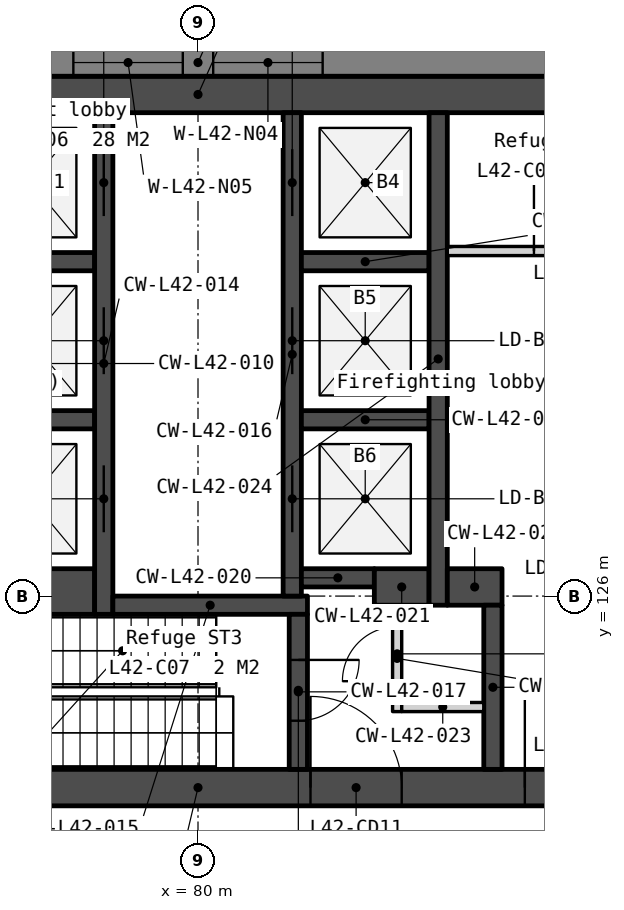
"""IFC4 building model, lengths in metres.
Left out: names, types, materials, properties, quantities, classifications, styles, units other than length and angle.
Written with IfcOpenShell. Run it as: python <this file> out.ifc"""

import sys

from ifc_helpers import new_model, si_unit, direction, frame, frame_2d, origin, place, context, subcontext, project, spatial, polyline, rectangle, outline, extrude, element, fill, save


model = new_model("IFC4")
c1 = context("Model", 3, precision=1e-05, world=origin(), true_north=direction((0.0, 1.0)))
c2 = subcontext(c1, "Body", "Model", "MODEL_VIEW")
j1 = project(units=[si_unit("LENGTHUNIT", "METRE"), si_unit("PLANEANGLEUNIT", "RADIAN")], contexts=[c1])
p1 = place(None, origin())
s1 = spatial("IfcSite", under=j1, at=p1, CompositionType="ELEMENT")
p2 = place(p1, origin())
s2 = spatial("IfcBuilding", under=s1, at=p2, CompositionType="ELEMENT")
p3 = place(p2, frame((0.0, 0.0, 167.6)))
s3 = spatial("IfcBuildingStorey", under=s2, at=p3, CompositionType="ELEMENT", Elevation=167.6)
p4 = place(p3, frame((69.0, 134.25, 0.0), z_axis=(0.0, 0.0, 1.0), x_axis=(1.0, 0.0, 0.0)))
e1 = element("IfcWall", 1, at=p4, inside=s3, PredefinedType="SOLIDWALL", context=c2, shape_type="SweptSolid", body=[
    extrude(rectangle(XDim=22.0, YDim=0.6, at=frame_2d((11.0, 0.0))), origin(), (0.0, 0.0, 1.0), 3.75),
])
p5 = place(p3, frame((69.0, 122.85, 0.0), z_axis=(0.0, 0.0, 1.0), x_axis=(1.0, 0.0, 0.0)))
e2 = element("IfcWall", 2, at=p5, inside=s3, PredefinedType="SOLIDWALL", context=c2, shape_type="SweptSolid", body=[
    extrude(rectangle(XDim=22.0, YDim=0.6, at=frame_2d((11.0, 0.0))), origin(), (0.0, 0.0, 1.0), 3.75),
])
p6 = place(p5, frame((16.375, 0.0, 0.0)))
e3 = element("IfcOpeningElement", 3, at=p6, cuts=e2, PredefinedType="OPENING", context=c2, shape_type="SweptSolid", body=[
    extrude(rectangle(XDim=1.8, YDim=2.1, at=frame_2d((0.9, 1.05))), frame((0.0, 0.31, 0.0), z_axis=(0.0, -1.0, 0.0), x_axis=(1.0, 0.0, 0.0)), (0.0, 0.0, 1.0), 0.62),
])
p7 = place(p5, frame((3.825, 0.0, 0.0)))
e4 = element("IfcOpeningElement", 4, at=p7, cuts=e2, PredefinedType="OPENING", context=c2, shape_type="SweptSolid", body=[
    extrude(rectangle(XDim=1.8, YDim=2.1, at=frame_2d((0.9, 1.05))), frame((0.0, 0.31, 0.0), z_axis=(0.0, -1.0, 0.0), x_axis=(1.0, 0.0, 0.0)), (0.0, 0.0, 1.0), 0.62),
])
p8 = place(p5, frame((12.85, 0.0, 0.0)))
e5 = element("IfcOpeningElement", 5, at=p8, cuts=e2, PredefinedType="OPENING", context=c2, shape_type="SweptSolid", body=[
    extrude(rectangle(XDim=1.5, YDim=2.1, at=frame_2d((0.75, 1.05))), frame((0.0, 0.31, 0.0), z_axis=(0.0, -1.0, 0.0), x_axis=(1.0, 0.0, 0.0)), (0.0, 0.0, 1.0), 0.62),
])
for number, where, z_axis, x_axis in (
    (6, (76.2, 131.5, 0.0), (0.0, 0.0, 1.0), (1.0, 0.0, 0.0)),
    (7, (76.2, 128.9, 0.0), (0.0, 0.0, 1.0), (1.0, 0.0, 0.0)),
):
    element("IfcWall", number, at=place(p3, frame(where, z_axis=z_axis, x_axis=x_axis)), inside=s3, PredefinedType="SOLIDWALL", context=c2, shape_type="SweptSolid", body=[
        extrude(rectangle(XDim=2.1, YDim=0.3, at=frame_2d((1.05, 0.0))), origin(), (0.0, 0.0, 1.0), 3.75),
    ])
p9 = place(p3, frame((76.2, 126.075, 0.0), z_axis=(0.0, 0.0, 1.0), x_axis=(1.0, 0.0, 0.0)))
e8 = element("IfcWall", 8, at=p9, inside=s3, PredefinedType="SOLIDWALL", context=c2, shape_type="SweptSolid", body=[
    extrude(rectangle(XDim=2.1, YDim=0.75, at=frame_2d((1.05, 0.0))), origin(), (0.0, 0.0, 1.0), 3.75),
])
p10 = place(p3, frame((78.45, 133.95, 0.0), z_axis=(0.0, 0.0, 1.0), x_axis=(0.0, -1.0, 0.0)))
e9 = element("IfcWall", 9, at=p10, inside=s3, PredefinedType="SOLIDWALL", context=c2, shape_type="SweptSolid", body=[
    extrude(rectangle(XDim=8.25, YDim=0.3, at=frame_2d((4.125, 0.0))), origin(), (0.0, 0.0, 1.0), 3.75),
])
p11 = place(p10, frame((0.6, 0.0, 0.0)))
e10 = element("IfcOpeningElement", 10, at=p11, cuts=e9, PredefinedType="OPENING", context=c2, shape_type="SweptSolid", body=[
    extrude(rectangle(XDim=1.1, YDim=2.1, at=frame_2d((0.55, 1.05))), frame((0.0, 0.16, 0.0), z_axis=(0.0, -1.0, 0.0), x_axis=(1.0, 0.0, 0.0)), (0.0, 0.0, 1.0), 0.32),
])
p12 = place(p10, frame((3.2, 0.0, 0.0)))
e11 = element("IfcOpeningElement", 11, at=p12, cuts=e9, PredefinedType="OPENING", context=c2, shape_type="SweptSolid", body=[
    extrude(rectangle(XDim=1.1, YDim=2.1, at=frame_2d((0.55, 1.05))), frame((0.0, 0.16, 0.0), z_axis=(0.0, -1.0, 0.0), x_axis=(1.0, 0.0, 0.0)), (0.0, 0.0, 1.0), 0.32),
])
p13 = place(p10, frame((5.8, 0.0, 0.0)))
e12 = element("IfcOpeningElement", 12, at=p13, cuts=e9, PredefinedType="OPENING", context=c2, shape_type="SweptSolid", body=[
    extrude(rectangle(XDim=1.1, YDim=2.1, at=frame_2d((0.55, 1.05))), frame((0.0, 0.16, 0.0), z_axis=(0.0, -1.0, 0.0), x_axis=(1.0, 0.0, 0.0)), (0.0, 0.0, 1.0), 0.32),
])
p14 = place(p3, frame((78.6, 125.85, 0.0), z_axis=(0.0, 0.0, 1.0), x_axis=(1.0, 0.0, 0.0)))
e13 = element("IfcWall", 13, at=p14, inside=s3, PredefinedType="SOLIDWALL", context=c2, shape_type="SweptSolid", body=[
    extrude(rectangle(XDim=3.2, YDim=0.3, at=frame_2d((1.6, 0.0))), origin(), (0.0, 0.0, 1.0), 3.75),
])
p15 = place(p3, frame((81.55, 133.95, 0.0), z_axis=(0.0, 0.0, 1.0), x_axis=(0.0, -1.0, 0.0)))
e14 = element("IfcWall", 14, at=p15, inside=s3, PredefinedType="SOLIDWALL", context=c2, shape_type="SweptSolid", body=[
    extrude(rectangle(XDim=7.95, YDim=0.3, at=frame_2d((3.975, 0.0))), origin(), (0.0, 0.0, 1.0), 3.75),
])
p16 = place(p15, frame((0.6, 0.0, 0.0)))
e15 = element("IfcOpeningElement", 15, at=p16, cuts=e14, PredefinedType="OPENING", context=c2, shape_type="SweptSolid", body=[
    extrude(rectangle(XDim=1.1, YDim=2.1, at=frame_2d((0.55, 1.05))), frame((0.0, 0.16, 0.0), z_axis=(0.0, -1.0, 0.0), x_axis=(1.0, 0.0, 0.0)), (0.0, 0.0, 1.0), 0.32),
])
p17 = place(p15, frame((3.2, 0.0, 0.0)))
e16 = element("IfcOpeningElement", 16, at=p17, cuts=e14, PredefinedType="OPENING", context=c2, shape_type="SweptSolid", body=[
    extrude(rectangle(XDim=1.1, YDim=2.1, at=frame_2d((0.55, 1.05))), frame((0.0, 0.16, 0.0), z_axis=(0.0, -1.0, 0.0), x_axis=(1.0, 0.0, 0.0)), (0.0, 0.0, 1.0), 0.32),
])
p18 = place(p15, frame((5.8, 0.0, 0.0)))
e17 = element("IfcOpeningElement", 17, at=p18, cuts=e14, PredefinedType="OPENING", context=c2, shape_type="SweptSolid", body=[
    extrude(rectangle(XDim=1.1, YDim=2.1, at=frame_2d((0.55, 1.05))), frame((0.0, 0.16, 0.0), z_axis=(0.0, -1.0, 0.0), x_axis=(1.0, 0.0, 0.0)), (0.0, 0.0, 1.0), 0.32),
])
p19 = place(p3, frame((81.65, 125.7, 0.0), z_axis=(0.0, 0.0, 1.0), x_axis=(0.0, -1.0, 0.0)))
e18 = element("IfcWall", 18, at=p19, inside=s3, PredefinedType="SOLIDWALL", context=c2, shape_type="SweptSolid", body=[
    extrude(rectangle(XDim=2.55, YDim=0.3, at=frame_2d((1.275, 0.0))), origin(), (0.0, 0.0, 1.0), 3.75),
])
p20 = place(p19, frame((0.75, 0.0, 0.0)))
e19 = element("IfcOpeningElement", 19, at=p20, cuts=e18, PredefinedType="OPENING", context=c2, shape_type="SweptSolid", body=[
    extrude(rectangle(XDim=1.0, YDim=2.1, at=frame_2d((0.5, 1.05))), frame((0.0, 0.16, 0.0), z_axis=(0.0, -1.0, 0.0), x_axis=(1.0, 0.0, 0.0)), (0.0, 0.0, 1.0), 0.32),
])
for number, where, z_axis, x_axis in (
    (20, (81.7, 131.5, 0.0), (0.0, 0.0, 1.0), (1.0, 0.0, 0.0)),
    (21, (81.7, 128.9, 0.0), (0.0, 0.0, 1.0), (1.0, 0.0, 0.0)),
):
    element("IfcWall", number, at=place(p3, frame(where, z_axis=z_axis, x_axis=x_axis)), inside=s3, PredefinedType="SOLIDWALL", context=c2, shape_type="SweptSolid", body=[
        extrude(rectangle(XDim=2.1, YDim=0.3, at=frame_2d((1.05, 0.0))), origin(), (0.0, 0.0, 1.0), 3.75),
    ])
p21 = place(p3, frame((81.7, 126.3, 0.0), z_axis=(0.0, 0.0, 1.0), x_axis=(1.0, 0.0, 0.0)))
e22 = element("IfcWall", 22, at=p21, inside=s3, PredefinedType="SOLIDWALL", context=c2, shape_type="SweptSolid", body=[
    extrude(rectangle(XDim=1.2, YDim=0.3, at=frame_2d((0.6, 0.0))), origin(), (0.0, 0.0, 1.0), 3.75),
])
p22 = place(p3, frame((82.9, 126.15, 0.0), z_axis=(0.0, 0.0, 1.0), x_axis=(1.0, 0.0, 0.0)))
e23 = element("IfcWall", 23, at=p22, inside=s3, PredefinedType="SOLIDWALL", context=c2, shape_type="SweptSolid", body=[
    extrude(rectangle(XDim=0.9, YDim=0.6, at=frame_2d((0.45, 0.0))), origin(), (0.0, 0.0, 1.0), 3.75),
])
p23 = place(p3, frame((83.275, 125.85, 0.0), z_axis=(0.0, 0.0, 1.0), x_axis=(0.0, -1.0, 0.0)))
e24 = element("IfcWall", 24, at=p23, inside=s3, PredefinedType="PARTITIONING", context=c2, shape_type="SweptSolid", body=[
    extrude(rectangle(XDim=1.75, YDim=0.15, at=frame_2d((0.875, 0.0))), origin(), (0.0, 0.0, 1.0), 3.75),
])
p24 = place(p23, frame((0.35, 0.0, 0.0)))
e25 = element("IfcOpeningElement", 25, at=p24, cuts=e24, PredefinedType="OPENING", context=c2, shape_type="SweptSolid", body=[
    extrude(rectangle(XDim=0.9, YDim=2.1, at=frame_2d((0.45, 1.05))), frame((0.0, 0.085, 0.0), z_axis=(0.0, -1.0, 0.0), x_axis=(1.0, 0.0, 0.0)), (0.0, 0.0, 1.0), 0.17),
])
p25 = place(p3, frame((83.35, 124.175, 0.0), z_axis=(0.0, 0.0, 1.0), x_axis=(1.0, 0.0, 0.0)))
e26 = element("IfcWall", 26, at=p25, inside=s3, PredefinedType="PARTITIONING", context=c2, shape_type="SweptSolid", body=[
    extrude(rectangle(XDim=1.35, YDim=0.15, at=frame_2d((0.675, 0.0))), origin(), (0.0, 0.0, 1.0), 3.75),
])
p26 = place(p3, frame((83.95, 133.95, 0.0), z_axis=(0.0, 0.0, 1.0), x_axis=(0.0, -1.0, 0.0)))
e27 = element("IfcWall", 27, at=p26, inside=s3, PredefinedType="SOLIDWALL", context=c2, shape_type="SweptSolid", body=[
    extrude(rectangle(XDim=8.1, YDim=0.3, at=frame_2d((4.05, 0.0))), origin(), (0.0, 0.0, 1.0), 3.75),
])
p27 = place(p3, frame((84.1, 131.675, 0.0), z_axis=(0.0, 0.0, 1.0), x_axis=(1.0, 0.0, 0.0)))
e28 = element("IfcWall", 28, at=p27, inside=s3, PredefinedType="PARTITIONING", context=c2, shape_type="SweptSolid", body=[
    extrude(rectangle(XDim=3.45, YDim=0.15, at=frame_2d((1.725, 0.0))), origin(), (0.0, 0.0, 1.0), 3.75),
])
p28 = place(p27, frame((1.425, 0.0, 0.0)))
e29 = element("IfcOpeningElement", 29, at=p28, cuts=e28, PredefinedType="OPENING", context=c2, shape_type="SweptSolid", body=[
    extrude(rectangle(XDim=1.5, YDim=2.1, at=frame_2d((0.75, 1.05))), frame((0.0, 0.085, 0.0), z_axis=(0.0, -1.0, 0.0), x_axis=(1.0, 0.0, 0.0)), (0.0, 0.0, 1.0), 0.17),
])
p29 = place(p3, frame((84.1, 126.15, 0.0), z_axis=(0.0, 0.0, 1.0), x_axis=(1.0, 0.0, 0.0)))
e30 = element("IfcWall", 30, at=p29, inside=s3, PredefinedType="SOLIDWALL", context=c2, shape_type="SweptSolid", body=[
    extrude(rectangle(XDim=0.9, YDim=0.6, at=frame_2d((0.45, 0.0))), origin(), (0.0, 0.0, 1.0), 3.75),
])
p30 = place(p3, frame((84.85, 125.85, 0.0), z_axis=(0.0, 0.0, 1.0), x_axis=(0.0, -1.0, 0.0)))
e31 = element("IfcWall", 31, at=p30, inside=s3, PredefinedType="SOLIDWALL", context=c2, shape_type="SweptSolid", body=[
    extrude(rectangle(XDim=2.7, YDim=0.3, at=frame_2d((1.35, 0.0))), origin(), (0.0, 0.0, 1.0), 3.75),
])
p31 = place(p3, frame((100.243, 134.775, -0.15), z_axis=(0.0, 0.0, 1.0), x_axis=(-1.0, 0.0, 0.0)))
e32 = element("IfcWall", 32, at=p31, inside=s3, PredefinedType="SOLIDWALL", context=c2, shape_type="SweptSolid", body=[
    extrude(outline(polyline([(40.486, 0.0), (40.486, 3.9), (0.0, 3.9), (0.0, 0.0), (40.486, 0.0)])), frame((0.0, 0.225, 0.0), z_axis=(0.0, -1.0, 0.0), x_axis=(1.0, 0.0, 0.0)), (0.0, 0.0, 1.0), 0.45),
])
p32 = place(p31, frame((0.87, 0.0, 0.95)))
e33 = element("IfcOpeningElement", 33, at=p32, cuts=e32, PredefinedType="OPENING", context=c2, shape_type="SweptSolid", body=[
    extrude(rectangle(XDim=1.2, YDim=2.2, at=frame_2d((0.6, 1.1))), frame((0.0, 0.235, 0.0), z_axis=(0.0, -1.0, 0.0), x_axis=(1.0, 0.0, 0.0)), (0.0, 0.0, 1.0), 0.47),
])
p33 = place(p31, frame((8.072, 0.0, 0.95)))
e34 = element("IfcOpeningElement", 34, at=p33, cuts=e32, PredefinedType="OPENING", context=c2, shape_type="SweptSolid", body=[
    extrude(rectangle(XDim=1.8, YDim=2.2, at=frame_2d((0.9, 1.1))), frame((0.0, 0.235, 0.0), z_axis=(0.0, -1.0, 0.0), x_axis=(1.0, 0.0, 0.0)), (0.0, 0.0, 1.0), 0.47),
])
p34 = place(p31, frame((10.372, 0.0, 0.95)))
e35 = element("IfcOpeningElement", 35, at=p34, cuts=e32, PredefinedType="OPENING", context=c2, shape_type="SweptSolid", body=[
    extrude(rectangle(XDim=1.8, YDim=2.2, at=frame_2d((0.9, 1.1))), frame((0.0, 0.235, 0.0), z_axis=(0.0, -1.0, 0.0), x_axis=(1.0, 0.0, 0.0)), (0.0, 0.0, 1.0), 0.47),
])
p35 = place(p31, frame((18.193, 0.0, 0.95)))
e36 = element("IfcOpeningElement", 36, at=p35, cuts=e32, PredefinedType="OPENING", context=c2, shape_type="SweptSolid", body=[
    extrude(rectangle(XDim=1.8, YDim=2.2, at=frame_2d((0.9, 1.1))), frame((0.0, 0.235, 0.0), z_axis=(0.0, -1.0, 0.0), x_axis=(1.0, 0.0, 0.0)), (0.0, 0.0, 1.0), 0.47),
])
p36 = place(p31, frame((20.493, 0.0, 0.95)))
e37 = element("IfcOpeningElement", 37, at=p36, cuts=e32, PredefinedType="OPENING", context=c2, shape_type="SweptSolid", body=[
    extrude(rectangle(XDim=1.8, YDim=2.2, at=frame_2d((0.9, 1.1))), frame((0.0, 0.235, 0.0), z_axis=(0.0, -1.0, 0.0), x_axis=(1.0, 0.0, 0.0)), (0.0, 0.0, 1.0), 0.47),
])
p37 = place(p31, frame((28.315, 0.0, 0.95)))
e38 = element("IfcOpeningElement", 38, at=p37, cuts=e32, PredefinedType="OPENING", context=c2, shape_type="SweptSolid", body=[
    extrude(rectangle(XDim=1.8, YDim=2.2, at=frame_2d((0.9, 1.1))), frame((0.0, 0.235, 0.0), z_axis=(0.0, -1.0, 0.0), x_axis=(1.0, 0.0, 0.0)), (0.0, 0.0, 1.0), 0.47),
])
p38 = place(p31, frame((30.615, 0.0, 0.95)))
e39 = element("IfcOpeningElement", 39, at=p38, cuts=e32, PredefinedType="OPENING", context=c2, shape_type="SweptSolid", body=[
    extrude(rectangle(XDim=1.8, YDim=2.2, at=frame_2d((0.9, 1.1))), frame((0.0, 0.235, 0.0), z_axis=(0.0, -1.0, 0.0), x_axis=(1.0, 0.0, 0.0)), (0.0, 0.0, 1.0), 0.47),
])
p39 = place(p31, frame((38.417, 0.0, 0.95)))
e40 = element("IfcOpeningElement", 40, at=p39, cuts=e32, PredefinedType="OPENING", context=c2, shape_type="SweptSolid", body=[
    extrude(rectangle(XDim=1.2, YDim=2.2, at=frame_2d((0.6, 1.1))), frame((0.0, 0.235, 0.0), z_axis=(0.0, -1.0, 0.0), x_axis=(1.0, 0.0, 0.0)), (0.0, 0.0, 1.0), 0.47),
])
p40 = place(p3, frame((57.652, 131.129, -0.15), z_axis=(0.0, 0.0, 1.0), x_axis=(0.499997369791, -0.866026922331, 0.0)))
e41 = element("IfcWall", 41, at=p40, inside=s3, PredefinedType="SOLIDWALL", context=c2, shape_type="SweptSolid", body=[
    extrude(outline(polyline([(40.486, 0.0), (40.486, 3.9), (0.0, 3.9), (0.0, 0.0), (40.486, 0.0)])), frame((0.0, 0.225, 0.0), z_axis=(0.0, -1.0, 0.0), x_axis=(1.0, 0.0, 0.0)), (0.0, 0.0, 1.0), 0.45),
])
p41 = place(p40, frame((0.87, 0.0, 0.95)))
e42 = element("IfcOpeningElement", 42, at=p41, cuts=e41, PredefinedType="OPENING", context=c2, shape_type="SweptSolid", body=[
    extrude(rectangle(XDim=1.2, YDim=2.2, at=frame_2d((0.6, 1.1))), frame((0.0, 0.235, 0.0), z_axis=(0.0, -1.0, 0.0), x_axis=(1.0, 0.0, 0.0)), (0.0, 0.0, 1.0), 0.47),
])
p42 = place(p40, frame((8.072, 0.0, 0.95)))
e43 = element("IfcOpeningElement", 43, at=p42, cuts=e41, PredefinedType="OPENING", context=c2, shape_type="SweptSolid", body=[
    extrude(rectangle(XDim=1.8, YDim=2.2, at=frame_2d((0.9, 1.1))), frame((0.0, 0.235, 0.0), z_axis=(0.0, -1.0, 0.0), x_axis=(1.0, 0.0, 0.0)), (0.0, 0.0, 1.0), 0.47),
])
p43 = place(p40, frame((10.372, 0.0, 0.95)))
e44 = element("IfcOpeningElement", 44, at=p43, cuts=e41, PredefinedType="OPENING", context=c2, shape_type="SweptSolid", body=[
    extrude(rectangle(XDim=1.8, YDim=2.2, at=frame_2d((0.9, 1.1))), frame((0.0, 0.235, 0.0), z_axis=(0.0, -1.0, 0.0), x_axis=(1.0, 0.0, 0.0)), (0.0, 0.0, 1.0), 0.47),
])
p44 = place(p40, frame((18.193, 0.0, 0.95)))
e45 = element("IfcOpeningElement", 45, at=p44, cuts=e41, PredefinedType="OPENING", context=c2, shape_type="SweptSolid", body=[
    extrude(rectangle(XDim=1.8, YDim=2.2, at=frame_2d((0.9, 1.1))), frame((0.0, 0.235, 0.0), z_axis=(0.0, -1.0, 0.0), x_axis=(1.0, 0.0, 0.0)), (0.0, 0.0, 1.0), 0.47),
])
p45 = place(p40, frame((20.493, 0.0, 0.95)))
e46 = element("IfcOpeningElement", 46, at=p45, cuts=e41, PredefinedType="OPENING", context=c2, shape_type="SweptSolid", body=[
    extrude(rectangle(XDim=1.8, YDim=2.2, at=frame_2d((0.9, 1.1))), frame((0.0, 0.235, 0.0), z_axis=(0.0, -1.0, 0.0), x_axis=(1.0, 0.0, 0.0)), (0.0, 0.0, 1.0), 0.47),
])
p46 = place(p40, frame((28.315, 0.0, 0.95)))
e47 = element("IfcOpeningElement", 47, at=p46, cuts=e41, PredefinedType="OPENING", context=c2, shape_type="SweptSolid", body=[
    extrude(rectangle(XDim=1.8, YDim=2.2, at=frame_2d((0.9, 1.1))), frame((0.0, 0.235, 0.0), z_axis=(0.0, -1.0, 0.0), x_axis=(1.0, 0.0, 0.0)), (0.0, 0.0, 1.0), 0.47),
])
p47 = place(p40, frame((30.615, 0.0, 0.95)))
e48 = element("IfcOpeningElement", 48, at=p47, cuts=e41, PredefinedType="OPENING", context=c2, shape_type="SweptSolid", body=[
    extrude(rectangle(XDim=1.8, YDim=2.2, at=frame_2d((0.9, 1.1))), frame((0.0, 0.235, 0.0), z_axis=(0.0, -1.0, 0.0), x_axis=(1.0, 0.0, 0.0)), (0.0, 0.0, 1.0), 0.47),
])
p48 = place(p40, frame((38.417, 0.0, 0.95)))
e49 = element("IfcOpeningElement", 49, at=p48, cuts=e41, PredefinedType="OPENING", context=c2, shape_type="SweptSolid", body=[
    extrude(rectangle(XDim=1.2, YDim=2.2, at=frame_2d((0.6, 1.1))), frame((0.0, 0.235, 0.0), z_axis=(0.0, -1.0, 0.0), x_axis=(1.0, 0.0, 0.0)), (0.0, 0.0, 1.0), 0.47),
])
p49 = place(p11, origin())
e50 = element("IfcDoor", 50, at=p49, inside=s3, OperationType="SLIDING_TO_RIGHT", PredefinedType="DOOR", context=c2, shape_type="SweptSolid", body=[
    extrude(rectangle(XDim=1.1, YDim=2.1, at=frame_2d((0.55, 1.05))), frame((0.0, 0.025, 0.0), z_axis=(0.0, -1.0, 0.0), x_axis=(1.0, 0.0, 0.0)), (0.0, 0.0, 1.0), 0.05),
])
fill(e10, e50)
p50 = place(p12, origin())
e51 = element("IfcDoor", 51, at=p50, inside=s3, OperationType="SLIDING_TO_RIGHT", PredefinedType="DOOR", context=c2, shape_type="SweptSolid", body=[
    extrude(rectangle(XDim=1.1, YDim=2.1, at=frame_2d((0.55, 1.05))), frame((0.0, 0.025, 0.0), z_axis=(0.0, -1.0, 0.0), x_axis=(1.0, 0.0, 0.0)), (0.0, 0.0, 1.0), 0.05),
])
fill(e11, e51)
p51 = place(p13, origin())
e52 = element("IfcDoor", 52, at=p51, inside=s3, OperationType="SLIDING_TO_RIGHT", PredefinedType="DOOR", context=c2, shape_type="SweptSolid", body=[
    extrude(rectangle(XDim=1.1, YDim=2.1, at=frame_2d((0.55, 1.05))), frame((0.0, 0.025, 0.0), z_axis=(0.0, -1.0, 0.0), x_axis=(1.0, 0.0, 0.0)), (0.0, 0.0, 1.0), 0.05),
])
fill(e12, e52)
p52 = place(p16, origin())
e53 = element("IfcDoor", 53, at=p52, inside=s3, OperationType="SLIDING_TO_LEFT", PredefinedType="DOOR", context=c2, shape_type="SweptSolid", body=[
    extrude(rectangle(XDim=1.1, YDim=2.1, at=frame_2d((0.55, 1.05))), frame((0.0, 0.025, 0.0), z_axis=(0.0, -1.0, 0.0), x_axis=(1.0, 0.0, 0.0)), (0.0, 0.0, 1.0), 0.05),
])
fill(e15, e53)
p53 = place(p17, origin())
e54 = element("IfcDoor", 54, at=p53, inside=s3, OperationType="SLIDING_TO_LEFT", PredefinedType="DOOR", context=c2, shape_type="SweptSolid", body=[
    extrude(rectangle(XDim=1.1, YDim=2.1, at=frame_2d((0.55, 1.05))), frame((0.0, 0.025, 0.0), z_axis=(0.0, -1.0, 0.0), x_axis=(1.0, 0.0, 0.0)), (0.0, 0.0, 1.0), 0.05),
])
fill(e16, e54)
p54 = place(p18, origin())
e55 = element("IfcDoor", 55, at=p54, inside=s3, OperationType="SLIDING_TO_LEFT", PredefinedType="DOOR", context=c2, shape_type="SweptSolid", body=[
    extrude(rectangle(XDim=1.1, YDim=2.1, at=frame_2d((0.55, 1.05))), frame((0.0, 0.025, 0.0), z_axis=(0.0, -1.0, 0.0), x_axis=(1.0, 0.0, 0.0)), (0.0, 0.0, 1.0), 0.05),
])
fill(e17, e55)
p55 = place(p6, origin())
e56 = element("IfcDoor", 56, at=p55, inside=s3, OperationType="DOUBLE_DOOR_DOUBLE_SWING", PredefinedType="DOOR", context=c2, shape_type="SweptSolid", body=[
    extrude(rectangle(XDim=1.8, YDim=2.1, at=frame_2d((0.9, 1.05))), frame((0.0, 0.025, 0.0), z_axis=(0.0, -1.0, 0.0), x_axis=(1.0, 0.0, 0.0)), (0.0, 0.0, 1.0), 0.05),
])
fill(e3, e56)
p56 = place(p8, origin())
e57 = element("IfcDoor", 57, at=p56, inside=s3, OperationType="DOUBLE_DOOR_DOUBLE_SWING", PredefinedType="DOOR", context=c2, shape_type="SweptSolid", body=[
    extrude(rectangle(XDim=1.5, YDim=2.1, at=frame_2d((0.75, 1.05))), frame((0.0, 0.025, 0.0), z_axis=(0.0, -1.0, 0.0), x_axis=(1.0, 0.0, 0.0)), (0.0, 0.0, 1.0), 0.05),
])
fill(e5, e57)
p57 = place(p24, origin())
e58 = element("IfcDoor", 58, at=p57, inside=s3, OperationType="SINGLE_SWING_RIGHT", PredefinedType="DOOR", context=c2, shape_type="SweptSolid", body=[
    extrude(rectangle(XDim=0.9, YDim=2.1, at=frame_2d((0.45, 1.05))), frame((0.0, 0.025, 0.0), z_axis=(0.0, -1.0, 0.0), x_axis=(1.0, 0.0, 0.0)), (0.0, 0.0, 1.0), 0.05),
])
fill(e25, e58)
p58 = place(p28, origin())
e59 = element("IfcDoor", 59, at=p58, inside=s3, OperationType="DOUBLE_DOOR_DOUBLE_SWING", PredefinedType="DOOR", context=c2, shape_type="SweptSolid", body=[
    extrude(rectangle(XDim=1.5, YDim=2.1, at=frame_2d((0.75, 1.05))), frame((0.0, 0.025, 0.0), z_axis=(0.0, -1.0, 0.0), x_axis=(1.0, 0.0, 0.0)), (0.0, 0.0, 1.0), 0.05),
])
fill(e29, e59)
p59 = place(p20, origin())
e60 = element("IfcDoor", 60, at=p59, inside=s3, OperationType="SINGLE_SWING_LEFT", PredefinedType="DOOR", context=c2, shape_type="SweptSolid", body=[
    extrude(rectangle(XDim=1.0, YDim=2.1, at=frame_2d((0.5, 1.05))), frame((0.0, 0.025, 0.0), z_axis=(0.0, -1.0, 0.0), x_axis=(1.0, 0.0, 0.0)), (0.0, 0.0, 1.0), 0.05),
])
fill(e19, e60)
p60 = place(p35, origin())
e61 = element("IfcWindow", 61, at=p60, inside=s3, PartitioningType="SINGLE_PANEL", PredefinedType="WINDOW", context=c2, shape_type="SweptSolid", body=[
    extrude(rectangle(XDim=1.8, YDim=2.2, at=frame_2d((0.9, 1.1))), frame((0.0, 0.03, 0.0), z_axis=(0.0, -1.0, 0.0), x_axis=(1.0, 0.0, 0.0)), (0.0, 0.0, 1.0), 0.06),
])
fill(e36, e61)
p61 = place(p36, origin())
e62 = element("IfcWindow", 62, at=p61, inside=s3, PartitioningType="SINGLE_PANEL", PredefinedType="WINDOW", context=c2, shape_type="SweptSolid", body=[
    extrude(rectangle(XDim=1.8, YDim=2.2, at=frame_2d((0.9, 1.1))), frame((0.0, 0.03, 0.0), z_axis=(0.0, -1.0, 0.0), x_axis=(1.0, 0.0, 0.0)), (0.0, 0.0, 1.0), 0.06),
])
fill(e37, e62)
save(model, sys.argv[1])
